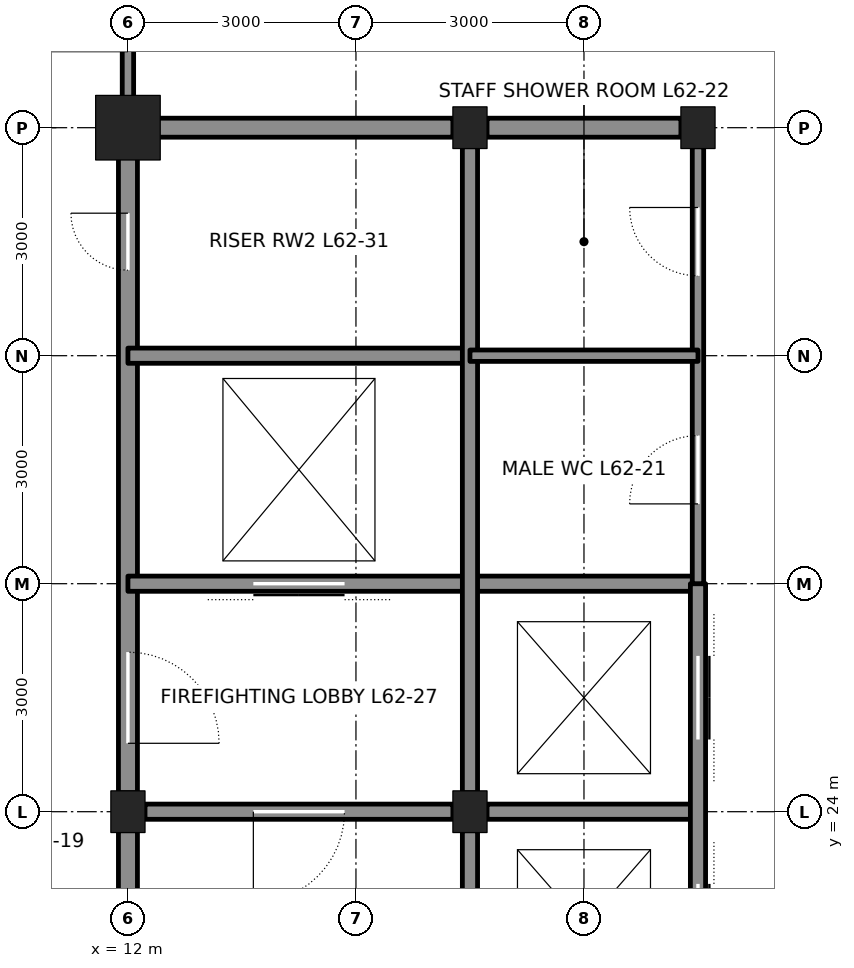
"""IFC4 building model, lengths in metres.
Left out: names, types, materials, properties, quantities, classifications, styles, units other than length and angle.
Written with IfcOpenShell. Run it as: python <this file> out.ifc"""

import sys

from ifc_helpers import new_model, si_unit, direction, frame, frame_2d, origin, origin_2d, place, context, subcontext, project, spatial, rectangle, hollow_rectangle, i_section, extrude, element, fill, save


model = new_model("IFC4")
c1 = context("Model", 3, precision=1e-05, world=origin(), true_north=direction((0.0, 1.0)))
c2 = subcontext(c1, "Body", "Model", "MODEL_VIEW")
j1 = project(units=[si_unit("LENGTHUNIT", "METRE"), si_unit("PLANEANGLEUNIT", "RADIAN")], contexts=[c1])
p1 = place(None, origin())
s1 = spatial("IfcSite", under=j1, at=p1, CompositionType="ELEMENT")
p2 = place(p1, origin())
s2 = spatial("IfcBuilding", under=s1, at=p2, CompositionType="ELEMENT")
p3 = place(p2, frame((0.0, 0.0, 279.0)))
s3 = spatial("IfcBuildingStorey", under=s2, at=p3, CompositionType="ELEMENT", Elevation=279.0)
p4 = place(p3, frame((12.0, 33.0, 0.0), z_axis=(0.0, 0.0, 1.0), x_axis=(1.0, 0.0, 0.0)))
e1 = element("IfcColumn", 1, at=p4, inside=s3, PredefinedType="COLUMN", context=c2, shape_type="SweptSolid", body=[
    extrude(hollow_rectangle(XDim=0.85, YDim=0.85, WallThickness=0.085, at=origin_2d()), origin(), (0.0, 0.0, 1.0), 4.2),
])
for number, where, z_axis, x_axis in (
    (2, (16.5, 33.0, 0.0), (0.0, 0.0, 1.0), (1.0, 0.0, 0.0)),
    (3, (19.5, 33.0, 0.0), (0.0, 0.0, 1.0), (1.0, 0.0, 0.0)),
    (4, (12.0, 24.0, 0.0), (0.0, 0.0, 1.0), (1.0, 0.0, 0.0)),
    (5, (16.5, 24.0, 0.0), (0.0, 0.0, 1.0), (1.0, 0.0, 0.0)),
):
    element("IfcColumn", number, at=place(p3, frame(where, z_axis=z_axis, x_axis=x_axis)), inside=s3, PredefinedType="COLUMN", context=c2, shape_type="SweptSolid", body=[
        extrude(i_section(OverallWidth=0.449, OverallDepth=0.549, WebThickness=0.072, FlangeThickness=0.115, at=origin_2d()), origin(), (0.0, 0.0, 1.0), 4.2),
    ])
p5 = place(p3, frame((12.0, 21.25, 0.0), z_axis=(0.0, 0.0, 1.0), x_axis=(0.0, 1.0, 0.0)))
e6 = element("IfcWall", 6, at=p5, inside=s3, PredefinedType="SOLIDWALL", context=c2, shape_type="SweptSolid", body=[
    extrude(rectangle(XDim=2.5, YDim=0.25, at=frame_2d((1.25, 0.0))), origin(), (0.0, 0.0, 1.0), 3.113),
])
p6 = place(p3, frame((12.0, 24.25, 0.0), z_axis=(0.0, 0.0, 1.0), x_axis=(0.0, 1.0, 0.0)))
e7 = element("IfcWall", 7, at=p6, inside=s3, PredefinedType="SOLIDWALL", context=c2, shape_type="SweptSolid", body=[
    extrude(rectangle(XDim=8.5, YDim=0.25, at=frame_2d((4.25, 0.0))), origin(), (0.0, 0.0, 1.0), 3.113),
])
p7 = place(p6, frame((0.65, 0.0, 0.0)))
e8 = element("IfcOpeningElement", 8, at=p7, cuts=e7, PredefinedType="OPENING", context=c2, shape_type="SweptSolid", body=[
    extrude(rectangle(XDim=1.2, YDim=2.1, at=frame_2d((0.6, 1.05))), frame((0.0, 0.135, 0.0), z_axis=(0.0, -1.0, 0.0), x_axis=(1.0, 0.0, 0.0)), (0.0, 0.0, 1.0), 0.27),
])
p8 = place(p6, frame((6.875, 0.0, 0.0)))
e9 = element("IfcOpeningElement", 9, at=p8, cuts=e7, PredefinedType="OPENING", context=c2, shape_type="SweptSolid", body=[
    extrude(rectangle(XDim=0.75, YDim=2.1, at=frame_2d((0.375, 1.05))), frame((0.0, 0.135, 0.0), z_axis=(0.0, -1.0, 0.0), x_axis=(1.0, 0.0, 0.0)), (0.0, 0.0, 1.0), 0.27),
])
p9 = place(p3, frame((12.225, 24.0, 0.0), z_axis=(0.0, 0.0, 1.0), x_axis=(1.0, 0.0, 0.0)))
e10 = element("IfcWall", 10, at=p9, inside=s3, PredefinedType="SOLIDWALL", context=c2, shape_type="SweptSolid", body=[
    extrude(rectangle(XDim=4.05, YDim=0.2, at=frame_2d((2.025, 0.0))), origin(), (0.0, 0.0, 1.0), 3.09),
])
p10 = place(p9, frame((1.425, 0.0, 0.0)))
e11 = element("IfcOpeningElement", 11, at=p10, cuts=e10, PredefinedType="OPENING", context=c2, shape_type="SweptSolid", body=[
    extrude(rectangle(XDim=1.2, YDim=2.1, at=frame_2d((0.6, 1.05))), frame((0.0, 0.11, 0.0), z_axis=(0.0, -1.0, 0.0), x_axis=(1.0, 0.0, 0.0)), (0.0, 0.0, 1.0), 0.22),
])
p11 = place(p3, frame((16.725, 24.0, 0.0), z_axis=(0.0, 0.0, 1.0), x_axis=(1.0, 0.0, 0.0)))
e12 = element("IfcWall", 12, at=p11, inside=s3, PredefinedType="SOLIDWALL", context=c2, shape_type="SweptSolid", body=[
    extrude(rectangle(XDim=2.775, YDim=0.2, at=frame_2d((1.388, 0.0))), origin(), (0.0, 0.0, 1.0), 3.09),
])
p12 = place(p3, frame((12.0, 27.0, 0.0), z_axis=(0.0, 0.0, 1.0), x_axis=(1.0, 0.0, 0.0)))
e13 = element("IfcWall", 13, at=p12, inside=s3, PredefinedType="SOLIDWALL", context=c2, shape_type="SweptSolid", body=[
    extrude(rectangle(XDim=7.5, YDim=0.2, at=frame_2d((3.75, 0.0))), origin(), (0.0, 0.0, 1.0), 4.04),
])
p13 = place(p12, frame((1.65, 0.0, 0.0)))
e14 = element("IfcOpeningElement", 14, at=p13, cuts=e13, PredefinedType="OPENING", context=c2, shape_type="SweptSolid", body=[
    extrude(rectangle(XDim=1.2, YDim=2.1, at=frame_2d((0.6, 1.05))), frame((0.0, 0.11, 0.0), z_axis=(0.0, -1.0, 0.0), x_axis=(1.0, 0.0, 0.0)), (0.0, 0.0, 1.0), 0.22),
])
p14 = place(p3, frame((12.0, 30.0, 0.0), z_axis=(0.0, 0.0, 1.0), x_axis=(1.0, 0.0, 0.0)))
e15 = element("IfcWall", 15, at=p14, inside=s3, PredefinedType="SOLIDWALL", context=c2, shape_type="SweptSolid", body=[
    extrude(rectangle(XDim=4.5, YDim=0.2, at=frame_2d((2.25, 0.0))), origin(), (0.0, 0.0, 1.0), 4.04),
])
p15 = place(p3, frame((12.25, 33.0, 0.0), z_axis=(0.0, 0.0, 1.0), x_axis=(1.0, 0.0, 0.0)))
e16 = element("IfcWall", 16, at=p15, inside=s3, PredefinedType="SOLIDWALL", context=c2, shape_type="SweptSolid", body=[
    extrude(rectangle(XDim=4.025, YDim=0.25, at=frame_2d((2.013, 0.0))), origin(), (0.0, 0.0, 1.0), 3.181),
])
p16 = place(p3, frame((16.725, 33.0, 0.0), z_axis=(0.0, 0.0, 1.0), x_axis=(1.0, 0.0, 0.0)))
e17 = element("IfcWall", 17, at=p16, inside=s3, PredefinedType="SOLIDWALL", context=c2, shape_type="SweptSolid", body=[
    extrude(rectangle(XDim=2.55, YDim=0.25, at=frame_2d((1.275, 0.0))), origin(), (0.0, 0.0, 1.0), 3.181),
])
p17 = place(p3, frame((16.5, 21.25, 0.0), z_axis=(0.0, 0.0, 1.0), x_axis=(0.0, 1.0, 0.0)))
e18 = element("IfcWall", 18, at=p17, inside=s3, PredefinedType="SOLIDWALL", context=c2, shape_type="SweptSolid", body=[
    extrude(rectangle(XDim=2.5, YDim=0.2, at=frame_2d((1.25, 0.0))), origin(), (0.0, 0.0, 1.0), 3.113),
])
p18 = place(p3, frame((16.5, 24.25, 0.0), z_axis=(0.0, 0.0, 1.0), x_axis=(0.0, 1.0, 0.0)))
e19 = element("IfcWall", 19, at=p18, inside=s3, PredefinedType="SOLIDWALL", context=c2, shape_type="SweptSolid", body=[
    extrude(rectangle(XDim=8.5, YDim=0.2, at=frame_2d((4.25, 0.0))), origin(), (0.0, 0.0, 1.0), 3.113),
])
p19 = place(p3, frame((19.5, 15.0, 0.0), z_axis=(0.0, 0.0, 1.0), x_axis=(0.0, 1.0, 0.0)))
e20 = element("IfcWall", 20, at=p19, inside=s3, PredefinedType="SOLIDWALL", context=c2, shape_type="SweptSolid", body=[
    extrude(rectangle(XDim=12.0, YDim=0.2, at=frame_2d((6.0, 0.0))), origin(), (0.0, 0.0, 1.0), 3.065),
])
p20 = place(p19, frame((0.95, 0.0, 0.0)))
e21 = element("IfcOpeningElement", 21, at=p20, cuts=e20, PredefinedType="OPENING", context=c2, shape_type="SweptSolid", body=[
    extrude(rectangle(XDim=1.1, YDim=2.1, at=frame_2d((0.55, 1.05))), frame((0.0, 0.11, 0.0), z_axis=(0.0, -1.0, 0.0), x_axis=(1.0, 0.0, 0.0)), (0.0, 0.0, 1.0), 0.22),
])
p21 = place(p19, frame((3.95, 0.0, 0.0)))
e22 = element("IfcOpeningElement", 22, at=p21, cuts=e20, PredefinedType="OPENING", context=c2, shape_type="SweptSolid", body=[
    extrude(rectangle(XDim=1.1, YDim=2.1, at=frame_2d((0.55, 1.05))), frame((0.0, 0.11, 0.0), z_axis=(0.0, -1.0, 0.0), x_axis=(1.0, 0.0, 0.0)), (0.0, 0.0, 1.0), 0.22),
])
p22 = place(p19, frame((6.95, 0.0, 0.0)))
e23 = element("IfcOpeningElement", 23, at=p22, cuts=e20, PredefinedType="OPENING", context=c2, shape_type="SweptSolid", body=[
    extrude(rectangle(XDim=1.1, YDim=2.1, at=frame_2d((0.55, 1.05))), frame((0.0, 0.11, 0.0), z_axis=(0.0, -1.0, 0.0), x_axis=(1.0, 0.0, 0.0)), (0.0, 0.0, 1.0), 0.22),
])
p23 = place(p19, frame((9.95, 0.0, 0.0)))
e24 = element("IfcOpeningElement", 24, at=p23, cuts=e20, PredefinedType="OPENING", context=c2, shape_type="SweptSolid", body=[
    extrude(rectangle(XDim=1.1, YDim=2.1, at=frame_2d((0.55, 1.05))), frame((0.0, 0.11, 0.0), z_axis=(0.0, -1.0, 0.0), x_axis=(1.0, 0.0, 0.0)), (0.0, 0.0, 1.0), 0.22),
])
p24 = place(p3, frame((19.5, 27.0, 0.0), z_axis=(0.0, 0.0, 1.0), x_axis=(0.0, 1.0, 0.0)))
e25 = element("IfcWall", 25, at=p24, inside=s3, PredefinedType="PARTITIONING", context=c2, shape_type="SweptSolid", body=[
    extrude(rectangle(XDim=5.75, YDim=0.15, at=frame_2d((2.875, 0.0))), origin(), (0.0, 0.0, 1.0), 3.065),
])
p25 = place(p24, frame((1.05, 0.0, 0.0)))
e26 = element("IfcOpeningElement", 26, at=p25, cuts=e25, PredefinedType="OPENING", context=c2, shape_type="SweptSolid", body=[
    extrude(rectangle(XDim=0.9, YDim=2.1, at=frame_2d((0.45, 1.05))), frame((0.0, 0.085, 0.0), z_axis=(0.0, -1.0, 0.0), x_axis=(1.0, 0.0, 0.0)), (0.0, 0.0, 1.0), 0.17),
])
p26 = place(p24, frame((4.05, 0.0, 0.0)))
e27 = element("IfcOpeningElement", 27, at=p26, cuts=e25, PredefinedType="OPENING", context=c2, shape_type="SweptSolid", body=[
    extrude(rectangle(XDim=0.9, YDim=2.1, at=frame_2d((0.45, 1.05))), frame((0.0, 0.085, 0.0), z_axis=(0.0, -1.0, 0.0), x_axis=(1.0, 0.0, 0.0)), (0.0, 0.0, 1.0), 0.17),
])
p27 = place(p3, frame((16.5, 30.0, 0.0), z_axis=(0.0, 0.0, 1.0), x_axis=(1.0, 0.0, 0.0)))
e28 = element("IfcWall", 28, at=p27, inside=s3, PredefinedType="PARTITIONING", context=c2, shape_type="SweptSolid", body=[
    extrude(rectangle(XDim=3.0, YDim=0.15, at=frame_2d((1.5, 0.0))), origin(), (0.0, 0.0, 1.0), 4.04),
])
p28 = place(p3, frame((12.0, 33.0, 0.0), z_axis=(0.0, 0.0, 1.0), x_axis=(0.0, 1.0, 0.0)))
e29 = element("IfcWall", 29, at=p28, inside=s3, PredefinedType="PARTITIONING", context=c2, shape_type="SweptSolid", body=[
    extrude(rectangle(XDim=3.0, YDim=0.15, at=frame_2d((1.5, 0.0))), origin(), (0.0, 0.0, 1.0), 3.271),
])
p29 = place(p28, frame((1.0, 0.0, 0.0)))
e30 = element("IfcOpeningElement", 30, at=p29, cuts=e29, PredefinedType="OPENING", context=c2, shape_type="SweptSolid", body=[
    extrude(rectangle(XDim=1.0, YDim=2.4, at=frame_2d((0.5, 1.2))), frame((0.0, 0.085, 0.0), z_axis=(0.0, -1.0, 0.0), x_axis=(1.0, 0.0, 0.0)), (0.0, 0.0, 1.0), 0.17),
])
p30 = place(p10, frame((1.2, 0.0, 0.0), z_axis=(0.0, 0.0, 1.0), x_axis=(-1.0, 0.0, 0.0)))
e31 = element("IfcDoor", 31, at=p30, inside=s3, OperationType="SINGLE_SWING_RIGHT", PredefinedType="DOOR", context=c2, shape_type="SweptSolid", body=[
    extrude(rectangle(XDim=1.2, YDim=2.1, at=frame_2d((0.6, 1.05))), frame((0.0, 0.025, 0.0), z_axis=(0.0, -1.0, 0.0), x_axis=(1.0, 0.0, 0.0)), (0.0, 0.0, 1.0), 0.05),
])
fill(e11, e31)
p31 = place(p7, frame((1.2, 0.0, 0.0), z_axis=(0.0, 0.0, 1.0), x_axis=(-1.0, 0.0, 0.0)))
e32 = element("IfcDoor", 32, at=p31, inside=s3, OperationType="SINGLE_SWING_RIGHT", PredefinedType="DOOR", context=c2, shape_type="SweptSolid", body=[
    extrude(rectangle(XDim=1.2, YDim=2.1, at=frame_2d((0.6, 1.05))), frame((0.0, 0.025, 0.0), z_axis=(0.0, -1.0, 0.0), x_axis=(1.0, 0.0, 0.0)), (0.0, 0.0, 1.0), 0.05),
])
fill(e8, e32)
p32 = place(p13, origin())
e33 = element("IfcDoor", 33, at=p32, inside=s3, OperationType="DOUBLE_DOOR_SLIDING", PredefinedType="DOOR", context=c2, shape_type="SweptSolid", body=[
    extrude(rectangle(XDim=1.2, YDim=2.1, at=frame_2d((0.6, 1.05))), frame((0.0, 0.025, 0.0), z_axis=(0.0, -1.0, 0.0), x_axis=(1.0, 0.0, 0.0)), (0.0, 0.0, 1.0), 0.05),
])
fill(e14, e33)
p33 = place(p8, origin())
e34 = element("IfcDoor", 34, at=p33, inside=s3, OperationType="SINGLE_SWING_RIGHT", PredefinedType="DOOR", context=c2, shape_type="SweptSolid", body=[
    extrude(rectangle(XDim=0.75, YDim=2.1, at=frame_2d((0.375, 1.05))), frame((0.0, 0.025, 0.0), z_axis=(0.0, -1.0, 0.0), x_axis=(1.0, 0.0, 0.0)), (0.0, 0.0, 1.0), 0.05),
])
fill(e9, e34)
p34 = place(p25, origin())
e35 = element("IfcDoor", 35, at=p34, inside=s3, OperationType="SINGLE_SWING_LEFT", PredefinedType="DOOR", context=c2, shape_type="SweptSolid", body=[
    extrude(rectangle(XDim=0.9, YDim=2.1, at=frame_2d((0.45, 1.05))), frame((0.0, 0.025, 0.0), z_axis=(0.0, -1.0, 0.0), x_axis=(1.0, 0.0, 0.0)), (0.0, 0.0, 1.0), 0.05),
])
fill(e26, e35)
p35 = place(p26, origin())
e36 = element("IfcDoor", 36, at=p35, inside=s3, OperationType="SINGLE_SWING_RIGHT", PredefinedType="DOOR", context=c2, shape_type="SweptSolid", body=[
    extrude(rectangle(XDim=0.9, YDim=2.1, at=frame_2d((0.45, 1.05))), frame((0.0, 0.025, 0.0), z_axis=(0.0, -1.0, 0.0), x_axis=(1.0, 0.0, 0.0)), (0.0, 0.0, 1.0), 0.05),
])
fill(e27, e36)
p36 = place(p22, origin())
e37 = element("IfcDoor", 37, at=p36, inside=s3, OperationType="DOUBLE_DOOR_SLIDING", PredefinedType="DOOR", context=c2, shape_type="SweptSolid", body=[
    extrude(rectangle(XDim=1.1, YDim=2.1, at=frame_2d((0.55, 1.05))), frame((0.0, 0.025, 0.0), z_axis=(0.0, -1.0, 0.0), x_axis=(1.0, 0.0, 0.0)), (0.0, 0.0, 1.0), 0.05),
])
fill(e23, e37)
p37 = place(p23, origin())
e38 = element("IfcDoor", 38, at=p37, inside=s3, OperationType="DOUBLE_DOOR_SLIDING", PredefinedType="DOOR", context=c2, shape_type="SweptSolid", body=[
    extrude(rectangle(XDim=1.1, YDim=2.1, at=frame_2d((0.55, 1.05))), frame((0.0, 0.025, 0.0), z_axis=(0.0, -1.0, 0.0), x_axis=(1.0, 0.0, 0.0)), (0.0, 0.0, 1.0), 0.05),
])
fill(e24, e38)
save(model, sys.argv[1])
